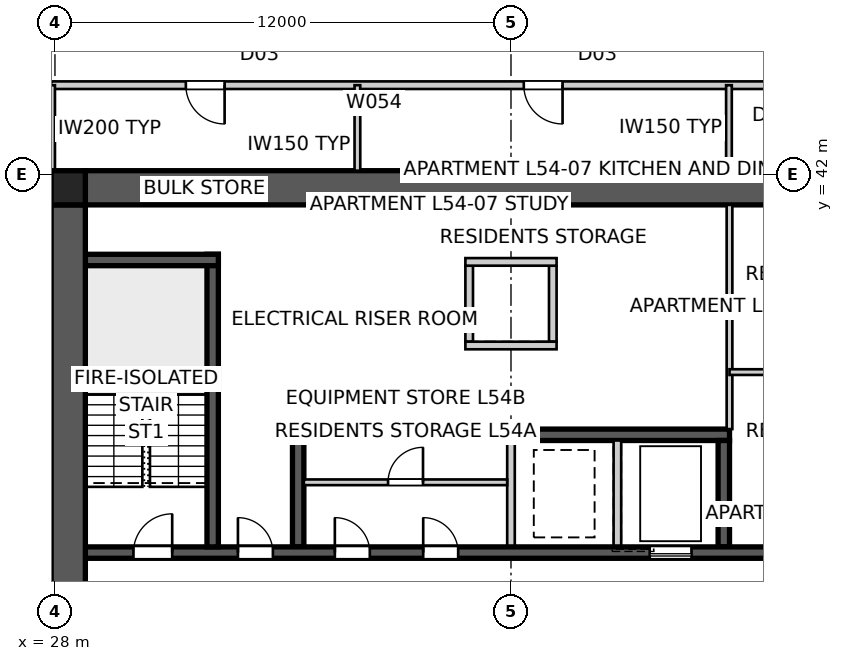
"""IFC4 building model, lengths in metres.
Left out: names, types, materials, properties, quantities, classifications, styles, units other than length and angle.
Written with IfcOpenShell. Run it as: python <this file> out.ifc"""

import sys

from ifc_helpers import new_model, si_unit, direction, frame, frame_2d, origin, origin_2d, place, context, subcontext, project, spatial, polyline, rectangle, outline, extrude, element, fill, save


model = new_model("IFC4")
c1 = context("Model", 3, precision=1e-05, world=origin(), true_north=direction((0.0, 1.0)))
c2 = subcontext(c1, "Body", "Model", "MODEL_VIEW")
j1 = project(units=[si_unit("LENGTHUNIT", "METRE"), si_unit("PLANEANGLEUNIT", "RADIAN")], contexts=[c1])
p1 = place(None, origin())
s1 = spatial("IfcSite", under=j1, at=p1, CompositionType="ELEMENT")
p2 = place(p1, origin())
s2 = spatial("IfcBuilding", under=s1, at=p2, CompositionType="ELEMENT")
p3 = place(p2, frame((0.0, 0.0, 196.4)))
s3 = spatial("IfcBuildingStorey", under=s2, at=p3, CompositionType="ELEMENT", Elevation=196.4)
p4 = place(p3, frame((28.8, 41.65, 0.0), z_axis=(0.0, 0.0, 1.0), x_axis=(1.0, 0.0, 0.0)))
e1 = element("IfcWall", 1, at=p4, inside=s3, PredefinedType="SHEAR", context=c2, shape_type="SweptSolid", body=[
    extrude(outline(polyline([(0.0, -0.45), (22.4, -0.45), (22.4, -0.025), (22.85, -0.025), (22.85, 0.025), (22.4, 0.025), (22.4, 0.45), (0.0, 0.45), (0.0, 0.025), (-0.45, 0.025), (-0.45, -0.025), (0.0, -0.025), (0.0, -0.45)])), origin(), (0.0, 0.0, 1.0), 3.4),
])
p5 = place(p3, frame((28.35, 41.2, 0.0), z_axis=(0.0, 0.0, 1.0), x_axis=(0.0, -1.0, 0.0)))
e2 = element("IfcWall", 2, at=p5, inside=s3, PredefinedType="SHEAR", context=c2, shape_type="SweptSolid", body=[
    extrude(outline(polyline([(0.0, -0.45), (22.4, -0.45), (22.4, -0.025), (22.85, -0.025), (22.85, 0.025), (22.4, 0.025), (22.4, 0.45), (0.0, 0.45), (0.0, 0.025), (-0.45, 0.025), (-0.45, -0.025), (0.0, -0.025), (0.0, -0.45)])), origin(), (0.0, 0.0, 1.0), 3.4),
])
p6 = place(p5, frame((11.14, 0.0, 0.0)))
e3 = element("IfcOpeningElement", 3, at=p6, cuts=e2, PredefinedType="OPENING", context=c2, shape_type="SweptSolid", body=[
    extrude(rectangle(XDim=1.02, YDim=2.4, at=frame_2d((0.51, 1.2))), frame((0.0, 0.46, 0.0), z_axis=(0.0, -1.0, 0.0), x_axis=(1.0, 0.0, 0.0)), (0.0, 0.0, 1.0), 0.92),
])
p7 = place(p3, frame((28.8, 32.05, 0.0), z_axis=(0.0, 0.0, 1.0), x_axis=(1.0, 0.0, 0.0)))
e4 = element("IfcWall", 4, at=p7, inside=s3, PredefinedType="SHEAR", context=c2, shape_type="SweptSolid", body=[
    extrude(rectangle(XDim=22.4, YDim=0.3, at=frame_2d((11.2, 0.0))), origin(), (0.0, 0.0, 1.0), 3.4),
])
p8 = place(p7, frame((19.04, 0.0, 0.0)))
e5 = element("IfcOpeningElement", 5, at=p8, cuts=e4, PredefinedType="OPENING", context=c2, shape_type="SweptSolid", body=[
    extrude(rectangle(XDim=0.92, YDim=2.1, at=frame_2d((0.46, 1.05))), frame((0.0, 0.16, 0.0), z_axis=(0.0, -1.0, 0.0), x_axis=(1.0, 0.0, 0.0)), (0.0, 0.0, 1.0), 0.32),
])
p9 = place(p7, frame((1.265, 0.0, 0.0)))
e6 = element("IfcOpeningElement", 6, at=p9, cuts=e4, PredefinedType="OPENING", context=c2, shape_type="SweptSolid", body=[
    extrude(rectangle(XDim=1.02, YDim=2.1, at=frame_2d((0.51, 1.05))), frame((0.0, 0.16, 0.0), z_axis=(0.0, -1.0, 0.0), x_axis=(1.0, 0.0, 0.0)), (0.0, 0.0, 1.0), 0.32),
])
p10 = place(p7, frame((4.015, 0.0, 0.0)))
e7 = element("IfcOpeningElement", 7, at=p10, cuts=e4, PredefinedType="OPENING", context=c2, shape_type="SweptSolid", body=[
    extrude(rectangle(XDim=0.92, YDim=2.1, at=frame_2d((0.46, 1.05))), frame((0.0, 0.16, 0.0), z_axis=(0.0, -1.0, 0.0), x_axis=(1.0, 0.0, 0.0)), (0.0, 0.0, 1.0), 0.32),
])
p11 = place(p7, frame((6.565, 0.0, 0.0)))
e8 = element("IfcOpeningElement", 8, at=p11, cuts=e4, PredefinedType="OPENING", context=c2, shape_type="SweptSolid", body=[
    extrude(rectangle(XDim=0.92, YDim=2.1, at=frame_2d((0.46, 1.05))), frame((0.0, 0.16, 0.0), z_axis=(0.0, -1.0, 0.0), x_axis=(1.0, 0.0, 0.0)), (0.0, 0.0, 1.0), 0.32),
])
p12 = place(p7, frame((8.89, 0.0, 0.0)))
e9 = element("IfcOpeningElement", 9, at=p12, cuts=e4, PredefinedType="OPENING", context=c2, shape_type="SweptSolid", body=[
    extrude(rectangle(XDim=0.92, YDim=2.1, at=frame_2d((0.46, 1.05))), frame((0.0, 0.16, 0.0), z_axis=(0.0, -1.0, 0.0), x_axis=(1.0, 0.0, 0.0)), (0.0, 0.0, 1.0), 0.32),
])
p13 = place(p7, frame((14.85, 0.0, 0.0)))
e10 = element("IfcOpeningElement", 10, at=p13, cuts=e4, PredefinedType="OPENING", context=c2, shape_type="SweptSolid", body=[
    extrude(rectangle(XDim=1.1, YDim=2.1, at=frame_2d((0.55, 1.05))), frame((0.0, 0.16, 0.0), z_axis=(0.0, -1.0, 0.0), x_axis=(1.0, 0.0, 0.0)), (0.0, 0.0, 1.0), 0.32),
])
p14 = place(p3, frame((34.25, 35.15, 0.0), z_axis=(0.0, 0.0, 1.0), x_axis=(1.0, 0.0, 0.0)))
e11 = element("IfcWall", 11, at=p14, inside=s3, PredefinedType="SHEAR", context=c2, shape_type="SweptSolid", body=[
    extrude(rectangle(XDim=11.5, YDim=0.3, at=frame_2d((5.75, 0.0))), origin(), (0.0, 0.0, 1.0), 3.4),
])
p15 = place(p3, frame((34.4, 32.2, 0.0), z_axis=(0.0, 0.0, 1.0), x_axis=(0.0, 1.0, 0.0)))
e12 = element("IfcWall", 12, at=p15, inside=s3, PredefinedType="SHEAR", context=c2, shape_type="SweptSolid", body=[
    extrude(rectangle(XDim=2.8, YDim=0.3, at=frame_2d((1.4, 0.0))), origin(), (0.0, 0.0, 1.0), 3.4),
])
for number, where, z_axis, x_axis in (
    (13, (40.0, 32.2, 0.0), (0.0, 0.0, 1.0), (0.0, 1.0, 0.0)),
    (14, (42.8, 32.2, 0.0), (0.0, 0.0, 1.0), (0.0, 1.0, 0.0)),
):
    element("IfcWall", number, at=place(p3, frame(where, z_axis=z_axis, x_axis=x_axis)), inside=s3, PredefinedType="SOLIDWALL", context=c2, shape_type="SweptSolid", body=[
        extrude(rectangle(XDim=2.8, YDim=0.2, at=frame_2d((1.4, 0.0))), origin(), (0.0, 0.0, 1.0), 3.4),
    ])
p16 = place(p3, frame((45.6, 32.2, 0.0), z_axis=(0.0, 0.0, 1.0), x_axis=(0.0, 1.0, 0.0)))
e15 = element("IfcWall", 15, at=p16, inside=s3, PredefinedType="SHEAR", context=c2, shape_type="SweptSolid", body=[
    extrude(rectangle(XDim=2.8, YDim=0.3, at=frame_2d((1.4, 0.0))), origin(), (0.0, 0.0, 1.0), 3.4),
])
p17 = place(p3, frame((32.15, 32.2, 0.0), z_axis=(0.0, 0.0, 1.0), x_axis=(0.0, 1.0, 0.0)))
e16 = element("IfcWall", 16, at=p17, inside=s3, PredefinedType="SHEAR", context=c2, shape_type="SweptSolid", body=[
    extrude(rectangle(XDim=7.7, YDim=0.3, at=frame_2d((3.85, 0.0))), origin(), (0.0, 0.0, 1.0), 3.4),
])
p18 = place(p3, frame((28.8, 39.75, 0.0), z_axis=(0.0, 0.0, 1.0), x_axis=(1.0, 0.0, 0.0)))
e17 = element("IfcWall", 17, at=p18, inside=s3, PredefinedType="SHEAR", context=c2, shape_type="SweptSolid", body=[
    extrude(rectangle(XDim=3.5, YDim=0.3, at=frame_2d((1.75, 0.0))), origin(), (0.0, 0.0, 1.0), 3.4),
])
for number, where, z_axis, x_axis in (
    (18, (38.9, 37.6, 0.0), (0.0, 0.0, 1.0), (0.0, 1.0, 0.0)),
    (19, (41.1, 37.6, 0.0), (0.0, 0.0, 1.0), (0.0, 1.0, 0.0)),
):
    element("IfcWall", number, at=place(p3, frame(where, z_axis=z_axis, x_axis=x_axis)), inside=s3, PredefinedType="SOLIDWALL", context=c2, shape_type="SweptSolid", body=[
        extrude(rectangle(XDim=2.0, YDim=0.2, at=frame_2d((1.0, 0.0))), origin(), (0.0, 0.0, 1.0), 3.4),
    ])
for number, where, z_axis, x_axis in (
    (20, (38.8, 37.5, 0.0), (0.0, 0.0, 1.0), (1.0, 0.0, 0.0)),
    (21, (38.8, 39.7, 0.0), (0.0, 0.0, 1.0), (1.0, 0.0, 0.0)),
):
    element("IfcWall", number, at=place(p3, frame(where, z_axis=z_axis, x_axis=x_axis)), inside=s3, PredefinedType="SOLIDWALL", context=c2, shape_type="SweptSolid", body=[
        extrude(rectangle(XDim=2.4, YDim=0.2, at=frame_2d((1.2, 0.0))), origin(), (0.0, 0.0, 1.0), 3.4),
    ])
p19 = place(p3, frame((28.35, 41.65, 0.0), z_axis=(0.0, 0.0, 1.0), x_axis=(1.0, 0.0, 0.0)))
e22 = element("IfcColumn", 22, at=p19, inside=s3, PredefinedType="COLUMN", context=c2, shape_type="SweptSolid", body=[
    extrude(rectangle(XDim=0.9, YDim=0.9, at=origin_2d()), origin(), (0.0, 0.0, 1.0), 3.4),
])
p20 = place(p3, frame((45.75, 41.2, 0.0), z_axis=(0.0, 0.0, 1.0), x_axis=(0.0, -1.0, 0.0)))
e23 = element("IfcWall", 23, at=p20, inside=s3, PredefinedType="SOLIDWALL", context=c2, shape_type="SweptSolid", body=[
    extrude(rectangle(XDim=5.9, YDim=0.15, at=frame_2d((2.95, 0.0))), origin(), (0.0, 0.0, 1.0), 3.25),
])
p21 = place(p3, frame((45.75, 36.8, 0.0), z_axis=(0.0, 0.0, 1.0), x_axis=(1.0, 0.0, 0.0)))
e24 = element("IfcWall", 24, at=p21, inside=s3, PredefinedType="SOLIDWALL", context=c2, shape_type="SweptSolid", body=[
    extrude(rectangle(XDim=5.45, YDim=0.15, at=frame_2d((2.725, 0.0))), origin(), (0.0, 0.0, 1.0), 3.25),
])
p22 = place(p21, frame((2.265, 0.0, 0.0)))
e25 = element("IfcOpeningElement", 25, at=p22, cuts=e24, PredefinedType="OPENING", context=c2, shape_type="SweptSolid", body=[
    extrude(rectangle(XDim=0.92, YDim=2.1, at=frame_2d((0.46, 1.05))), frame((0.0, 0.085, 0.0), z_axis=(0.0, -1.0, 0.0), x_axis=(1.0, 0.0, 0.0)), (0.0, 0.0, 1.0), 0.17),
])
p23 = place(p3, frame((52.1, 44.35, 0.0), z_axis=(0.0, 0.0, 1.0), x_axis=(-1.0, 0.0, 0.0)))
e26 = element("IfcWall", 26, at=p23, inside=s3, PredefinedType="PARTITIONING", context=c2, shape_type="SweptSolid", body=[
    extrude(rectangle(XDim=24.2, YDim=0.2, at=frame_2d((12.1, 0.0))), origin(), (0.0, 0.0, 1.0), 3.25),
])
p24 = place(p23, frame((10.743, 0.0, 0.0)))
e27 = element("IfcOpeningElement", 27, at=p24, cuts=e26, PredefinedType="OPENING", context=c2, shape_type="SweptSolid", body=[
    extrude(rectangle(XDim=1.02, YDim=2.1, at=frame_2d((0.51, 1.05))), frame((0.0, 0.11, 0.0), z_axis=(0.0, -1.0, 0.0), x_axis=(1.0, 0.0, 0.0)), (0.0, 0.0, 1.0), 0.22),
])
p25 = place(p23, frame((19.636, 0.0, 0.0)))
e28 = element("IfcOpeningElement", 28, at=p25, cuts=e26, PredefinedType="OPENING", context=c2, shape_type="SweptSolid", body=[
    extrude(rectangle(XDim=1.02, YDim=2.1, at=frame_2d((0.51, 1.05))), frame((0.0, 0.11, 0.0), z_axis=(0.0, -1.0, 0.0), x_axis=(1.0, 0.0, 0.0)), (0.0, 0.0, 1.0), 0.22),
])
p26 = place(p23, frame((3.297, 0.0, 0.0)))
e29 = element("IfcOpeningElement", 29, at=p26, cuts=e26, PredefinedType="OPENING", context=c2, shape_type="SweptSolid", body=[
    extrude(rectangle(XDim=1.02, YDim=2.1, at=frame_2d((0.51, 1.05))), frame((0.0, 0.11, 0.0), z_axis=(0.0, -1.0, 0.0), x_axis=(1.0, 0.0, 0.0)), (0.0, 0.0, 1.0), 0.22),
])
p27 = place(p3, frame((27.9, 44.35, 0.0), z_axis=(0.0, 0.0, 1.0), x_axis=(0.0, -1.0, 0.0)))
e30 = element("IfcWall", 30, at=p27, inside=s3, PredefinedType="PARTITIONING", context=c2, shape_type="SweptSolid", body=[
    extrude(rectangle(XDim=2.3, YDim=0.2, at=frame_2d((1.15, 0.0))), origin(), (0.0, 0.0, 1.0), 3.25),
])
p28 = place(p3, frame((35.958, 42.1, 0.0), z_axis=(0.0, 0.0, 1.0), x_axis=(0.0, 1.0, 0.0)))
e31 = element("IfcWall", 31, at=p28, inside=s3, PredefinedType="SOLIDWALL", context=c2, shape_type="SweptSolid", body=[
    extrude(rectangle(XDim=2.25, YDim=0.15, at=frame_2d((1.125, 0.0))), origin(), (0.0, 0.0, 1.0), 3.25),
])
p29 = place(p3, frame((45.735, 42.1, 0.0), z_axis=(0.0, 0.0, 1.0), x_axis=(0.0, 1.0, 0.0)))
e32 = element("IfcWall", 32, at=p29, inside=s3, PredefinedType="SOLIDWALL", context=c2, shape_type="SweptSolid", body=[
    extrude(rectangle(XDim=2.25, YDim=0.15, at=frame_2d((1.125, 0.0))), origin(), (0.0, 0.0, 1.0), 2.796),
])
p30 = place(p3, frame((34.55, 33.9, 0.0), z_axis=(0.0, 0.0, 1.0), x_axis=(1.0, 0.0, 0.0)))
e33 = element("IfcWall", 33, at=p30, inside=s3, PredefinedType="SOLIDWALL", context=c2, shape_type="SweptSolid", body=[
    extrude(rectangle(XDim=5.35, YDim=0.15, at=frame_2d((2.675, 0.0))), origin(), (0.0, 0.0, 1.0), 3.25),
])
p31 = place(p30, frame((2.215, 0.0, 0.0)))
e34 = element("IfcOpeningElement", 34, at=p31, cuts=e33, PredefinedType="OPENING", context=c2, shape_type="SweptSolid", body=[
    extrude(rectangle(XDim=0.92, YDim=2.1, at=frame_2d((0.46, 1.05))), frame((0.0, 0.085, 0.0), z_axis=(0.0, -1.0, 0.0), x_axis=(1.0, 0.0, 0.0)), (0.0, 0.0, 1.0), 0.17),
])
p32 = place(p9, origin())
e35 = element("IfcDoor", 35, at=p32, inside=s3, OperationType="SINGLE_SWING_RIGHT", PredefinedType="DOOR", context=c2, shape_type="SweptSolid", body=[
    extrude(rectangle(XDim=1.02, YDim=2.1, at=frame_2d((0.51, 1.05))), frame((0.0, 0.025, 0.0), z_axis=(0.0, -1.0, 0.0), x_axis=(1.0, 0.0, 0.0)), (0.0, 0.0, 1.0), 0.05),
])
fill(e6, e35)
p33 = place(p10, origin())
e36 = element("IfcDoor", 36, at=p33, inside=s3, OperationType="SINGLE_SWING_LEFT", PredefinedType="DOOR", context=c2, shape_type="SweptSolid", body=[
    extrude(rectangle(XDim=0.92, YDim=2.1, at=frame_2d((0.46, 1.05))), frame((0.0, 0.025, 0.0), z_axis=(0.0, -1.0, 0.0), x_axis=(1.0, 0.0, 0.0)), (0.0, 0.0, 1.0), 0.05),
])
fill(e7, e36)
p34 = place(p24, origin())
e37 = element("IfcDoor", 37, at=p34, inside=s3, OperationType="SINGLE_SWING_LEFT", PredefinedType="DOOR", context=c2, shape_type="SweptSolid", body=[
    extrude(rectangle(XDim=1.02, YDim=2.1, at=frame_2d((0.51, 1.05))), frame((0.0, 0.025, 0.0), z_axis=(0.0, -1.0, 0.0), x_axis=(1.0, 0.0, 0.0)), (0.0, 0.0, 1.0), 0.05),
])
fill(e27, e37)
p35 = place(p25, origin())
e38 = element("IfcDoor", 38, at=p35, inside=s3, OperationType="SINGLE_SWING_LEFT", PredefinedType="DOOR", context=c2, shape_type="SweptSolid", body=[
    extrude(rectangle(XDim=1.02, YDim=2.1, at=frame_2d((0.51, 1.05))), frame((0.0, 0.025, 0.0), z_axis=(0.0, -1.0, 0.0), x_axis=(1.0, 0.0, 0.0)), (0.0, 0.0, 1.0), 0.05),
])
fill(e28, e38)
p36 = place(p11, origin())
e39 = element("IfcDoor", 39, at=p36, inside=s3, OperationType="SINGLE_SWING_LEFT", PredefinedType="DOOR", context=c2, shape_type="SweptSolid", body=[
    extrude(rectangle(XDim=0.92, YDim=2.1, at=frame_2d((0.46, 1.05))), frame((0.0, 0.025, 0.0), z_axis=(0.0, -1.0, 0.0), x_axis=(1.0, 0.0, 0.0)), (0.0, 0.0, 1.0), 0.05),
])
fill(e8, e39)
p37 = place(p12, origin())
e40 = element("IfcDoor", 40, at=p37, inside=s3, OperationType="SINGLE_SWING_LEFT", PredefinedType="DOOR", context=c2, shape_type="SweptSolid", body=[
    extrude(rectangle(XDim=0.92, YDim=2.1, at=frame_2d((0.46, 1.05))), frame((0.0, 0.025, 0.0), z_axis=(0.0, -1.0, 0.0), x_axis=(1.0, 0.0, 0.0)), (0.0, 0.0, 1.0), 0.05),
])
fill(e9, e40)
p38 = place(p31, origin())
e41 = element("IfcDoor", 41, at=p38, inside=s3, OperationType="SINGLE_SWING_RIGHT", PredefinedType="DOOR", context=c2, shape_type="SweptSolid", body=[
    extrude(rectangle(XDim=0.92, YDim=2.1, at=frame_2d((0.46, 1.05))), frame((0.0, 0.025, 0.0), z_axis=(0.0, -1.0, 0.0), x_axis=(1.0, 0.0, 0.0)), (0.0, 0.0, 1.0), 0.05),
])
fill(e34, e41)
p39 = place(p13, origin())
e42 = element("IfcDoor", 42, at=p39, inside=s3, OperationType="SLIDING_TO_LEFT", PredefinedType="DOOR", context=c2, shape_type="SweptSolid", body=[
    extrude(rectangle(XDim=1.1, YDim=2.1, at=frame_2d((0.55, 1.05))), frame((0.0, 0.025, 0.0), z_axis=(0.0, -1.0, 0.0), x_axis=(1.0, 0.0, 0.0)), (0.0, 0.0, 1.0), 0.05),
])
fill(e10, e42)
save(model, sys.argv[1])
